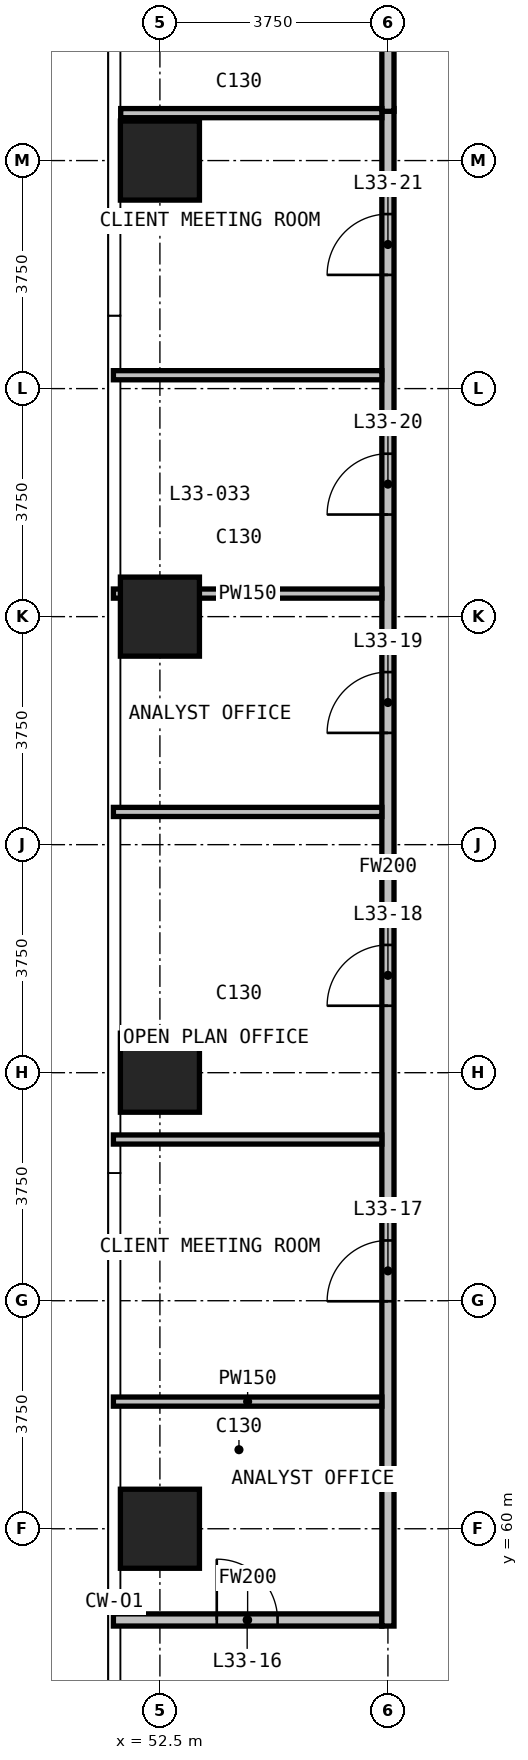
"""IFC4 building model, lengths in metres.
Left out: names, types, materials, properties, quantities, classifications, styles, units other than length and angle.
Written with IfcOpenShell. Run it as: python <this file> out.ifc"""

import sys

from ifc_helpers import new_model, si_unit, direction, frame, frame_2d, origin, origin_2d, place, context, subcontext, project, spatial, rectangle, extrude, element, fill, save


model = new_model("IFC4")
c1 = context("Model", 3, precision=1e-05, world=origin(), true_north=direction((0.0, 1.0)))
c2 = subcontext(c1, "Body", "Model", "MODEL_VIEW")
j1 = project(units=[si_unit("LENGTHUNIT", "METRE"), si_unit("PLANEANGLEUNIT", "RADIAN")], contexts=[c1])
p1 = place(None, origin())
s1 = spatial("IfcSite", under=j1, at=p1, CompositionType="ELEMENT")
p2 = place(p1, origin())
s2 = spatial("IfcBuilding", under=s1, at=p2, CompositionType="ELEMENT")
p3 = place(p2, frame((0.0, 0.0, 132.4)))
s3 = spatial("IfcBuildingStorey", under=s2, at=p3, CompositionType="ELEMENT", Elevation=132.4)
for number, where, z_axis, x_axis in (
    (1, (52.5, 60.0, 0.0), (0.0, 0.0, 1.0), (1.0, 0.0, 0.0)),
    (2, (52.5, 67.5, 0.0), (0.0, 0.0, 1.0), (1.0, 0.0, 0.0)),
    (3, (52.5, 75.0, 0.0), (0.0, 0.0, 1.0), (1.0, 0.0, 0.0)),
    (4, (52.5, 82.5, 0.0), (0.0, 0.0, 1.0), (1.0, 0.0, 0.0)),
):
    element("IfcColumn", number, at=place(p3, frame(where, z_axis=z_axis, x_axis=x_axis)), inside=s3, PredefinedType="COLUMN", context=c2, shape_type="SweptSolid", body=[
        extrude(rectangle(XDim=1.3, YDim=1.3, at=origin_2d()), origin(), (0.0, 0.0, 1.0), 3.6),
    ])
p4 = place(p3, frame((51.735, 58.5, 0.0), z_axis=(0.0, 0.0, 1.0), x_axis=(1.0, 0.0, 0.0)))
e5 = element("IfcWall", 5, at=p4, inside=s3, PredefinedType="PARTITIONING", context=c2, shape_type="SweptSolid", body=[
    extrude(rectangle(XDim=4.415, YDim=0.2, at=frame_2d((2.208, 0.0))), origin(), (0.0, 0.0, 1.0), 3.3),
])
p5 = place(p4, frame((1.7, 0.0, 0.0)))
e6 = element("IfcOpeningElement", 6, at=p5, cuts=e5, PredefinedType="OPENING", context=c2, shape_type="SweptSolid", body=[
    extrude(rectangle(XDim=1.0, YDim=2.2, at=frame_2d((0.5, 1.1))), frame((0.0, 0.11, 0.0), z_axis=(0.0, -1.0, 0.0), x_axis=(1.0, 0.0, 0.0)), (0.0, 0.0, 1.0), 0.22),
])
p6 = place(p3, frame((56.25, 58.4, 0.0), z_axis=(0.0, 0.0, 1.0), x_axis=(0.0, 1.0, 0.0)))
e7 = element("IfcWall", 7, at=p6, inside=s3, PredefinedType="PARTITIONING", context=c2, shape_type="SweptSolid", body=[
    extrude(rectangle(XDim=24.955, YDim=0.2, at=frame_2d((12.478, 0.0))), origin(), (0.0, 0.0, 1.0), 3.3),
])
p7 = place(p6, frame((5.341, 0.0, 0.0)))
e8 = element("IfcOpeningElement", 8, at=p7, cuts=e7, PredefinedType="OPENING", context=c2, shape_type="SweptSolid", body=[
    extrude(rectangle(XDim=1.0, YDim=2.2, at=frame_2d((0.5, 1.1))), frame((0.0, 0.11, 0.0), z_axis=(0.0, -1.0, 0.0), x_axis=(1.0, 0.0, 0.0)), (0.0, 0.0, 1.0), 0.22),
])
p8 = place(p6, frame((10.201, 0.0, 0.0)))
e9 = element("IfcOpeningElement", 9, at=p8, cuts=e7, PredefinedType="OPENING", context=c2, shape_type="SweptSolid", body=[
    extrude(rectangle(XDim=1.0, YDim=2.2, at=frame_2d((0.5, 1.1))), frame((0.0, 0.11, 0.0), z_axis=(0.0, -1.0, 0.0), x_axis=(1.0, 0.0, 0.0)), (0.0, 0.0, 1.0), 0.22),
])
p9 = place(p6, frame((14.688, 0.0, 0.0)))
e10 = element("IfcOpeningElement", 10, at=p9, cuts=e7, PredefinedType="OPENING", context=c2, shape_type="SweptSolid", body=[
    extrude(rectangle(XDim=1.0, YDim=2.2, at=frame_2d((0.5, 1.1))), frame((0.0, 0.11, 0.0), z_axis=(0.0, -1.0, 0.0), x_axis=(1.0, 0.0, 0.0)), (0.0, 0.0, 1.0), 0.22),
])
p10 = place(p6, frame((18.279, 0.0, 0.0)))
e11 = element("IfcOpeningElement", 11, at=p10, cuts=e7, PredefinedType="OPENING", context=c2, shape_type="SweptSolid", body=[
    extrude(rectangle(XDim=1.0, YDim=2.2, at=frame_2d((0.5, 1.1))), frame((0.0, 0.11, 0.0), z_axis=(0.0, -1.0, 0.0), x_axis=(1.0, 0.0, 0.0)), (0.0, 0.0, 1.0), 0.22),
])
p11 = place(p6, frame((22.22, 0.0, 0.0)))
e12 = element("IfcOpeningElement", 12, at=p11, cuts=e7, PredefinedType="OPENING", context=c2, shape_type="SweptSolid", body=[
    extrude(rectangle(XDim=1.0, YDim=2.2, at=frame_2d((0.5, 1.1))), frame((0.0, 0.11, 0.0), z_axis=(0.0, -1.0, 0.0), x_axis=(1.0, 0.0, 0.0)), (0.0, 0.0, 1.0), 0.22),
])
p12 = place(p3, frame((56.25, 83.31, 0.0), z_axis=(0.0, 0.0, 1.0), x_axis=(0.0, 1.0, 0.0)))
e13 = element("IfcWall", 13, at=p12, inside=s3, PredefinedType="PARTITIONING", context=c2, shape_type="SweptSolid", body=[
    extrude(rectangle(XDim=7.335, YDim=0.2, at=frame_2d((3.667, 0.0))), origin(), (0.0, 0.0, 1.0), 3.3),
])
for number, where, z_axis, x_axis in (
    (14, (51.735, 62.091, 0.0), (0.0, 0.0, 1.0), (1.0, 0.0, 0.0)),
    (15, (51.735, 66.401, 0.0), (0.0, 0.0, 1.0), (1.0, 0.0, 0.0)),
    (16, (51.735, 71.788, 0.0), (0.0, 0.0, 1.0), (1.0, 0.0, 0.0)),
    (17, (51.735, 75.379, 0.0), (0.0, 0.0, 1.0), (1.0, 0.0, 0.0)),
    (18, (51.735, 78.97, 0.0), (0.0, 0.0, 1.0), (1.0, 0.0, 0.0)),
):
    element("IfcWall", number, at=place(p3, frame(where, z_axis=z_axis, x_axis=x_axis)), inside=s3, PredefinedType="PARTITIONING", context=c2, shape_type="SweptSolid", body=[
        extrude(rectangle(XDim=4.415, YDim=0.15, at=frame_2d((2.208, 0.0))), origin(), (0.0, 0.0, 1.0), 3.3),
    ])
p13 = place(p3, frame((51.855, 83.28, 0.0), z_axis=(0.0, 0.0, 1.0), x_axis=(1.0, 0.0, 0.0)))
e19 = element("IfcWall", 19, at=p13, inside=s3, PredefinedType="PARTITIONING", context=c2, shape_type="SweptSolid", body=[
    extrude(rectangle(XDim=4.295, YDim=0.15, at=frame_2d((2.147, 0.0))), origin(), (0.0, 0.0, 1.0), 3.3),
])
p14 = place(p5, origin())
e20 = element("IfcDoor", 20, at=p14, inside=s3, OperationType="SINGLE_SWING_RIGHT", PredefinedType="DOOR", context=c2, shape_type="SweptSolid", body=[
    extrude(rectangle(XDim=1.0, YDim=2.2, at=frame_2d((0.5, 1.1))), frame((0.0, 0.025, 0.0), z_axis=(0.0, -1.0, 0.0), x_axis=(1.0, 0.0, 0.0)), (0.0, 0.0, 1.0), 0.05),
])
fill(e6, e20)
p15 = place(p7, origin())
e21 = element("IfcDoor", 21, at=p15, inside=s3, OperationType="SINGLE_SWING_LEFT", PredefinedType="DOOR", context=c2, shape_type="SweptSolid", body=[
    extrude(rectangle(XDim=1.0, YDim=2.2, at=frame_2d((0.5, 1.1))), frame((0.0, 0.025, 0.0), z_axis=(0.0, -1.0, 0.0), x_axis=(1.0, 0.0, 0.0)), (0.0, 0.0, 1.0), 0.05),
])
fill(e8, e21)
p16 = place(p8, origin())
e22 = element("IfcDoor", 22, at=p16, inside=s3, OperationType="SINGLE_SWING_RIGHT", PredefinedType="DOOR", context=c2, shape_type="SweptSolid", body=[
    extrude(rectangle(XDim=1.0, YDim=2.2, at=frame_2d((0.5, 1.1))), frame((0.0, 0.025, 0.0), z_axis=(0.0, -1.0, 0.0), x_axis=(1.0, 0.0, 0.0)), (0.0, 0.0, 1.0), 0.05),
])
fill(e9, e22)
p17 = place(p9, origin())
e23 = element("IfcDoor", 23, at=p17, inside=s3, OperationType="SINGLE_SWING_RIGHT", PredefinedType="DOOR", context=c2, shape_type="SweptSolid", body=[
    extrude(rectangle(XDim=1.0, YDim=2.2, at=frame_2d((0.5, 1.1))), frame((0.0, 0.025, 0.0), z_axis=(0.0, -1.0, 0.0), x_axis=(1.0, 0.0, 0.0)), (0.0, 0.0, 1.0), 0.05),
])
fill(e10, e23)
p18 = place(p10, origin())
e24 = element("IfcDoor", 24, at=p18, inside=s3, OperationType="SINGLE_SWING_LEFT", PredefinedType="DOOR", context=c2, shape_type="SweptSolid", body=[
    extrude(rectangle(XDim=1.0, YDim=2.2, at=frame_2d((0.5, 1.1))), frame((0.0, 0.025, 0.0), z_axis=(0.0, -1.0, 0.0), x_axis=(1.0, 0.0, 0.0)), (0.0, 0.0, 1.0), 0.05),
])
fill(e11, e24)
p19 = place(p11, origin())
e25 = element("IfcDoor", 25, at=p19, inside=s3, OperationType="SINGLE_SWING_LEFT", PredefinedType="DOOR", context=c2, shape_type="SweptSolid", body=[
    extrude(rectangle(XDim=1.0, YDim=2.2, at=frame_2d((0.5, 1.1))), frame((0.0, 0.025, 0.0), z_axis=(0.0, -1.0, 0.0), x_axis=(1.0, 0.0, 0.0)), (0.0, 0.0, 1.0), 0.05),
])
fill(e12, e25)
save(model, sys.argv[1])
